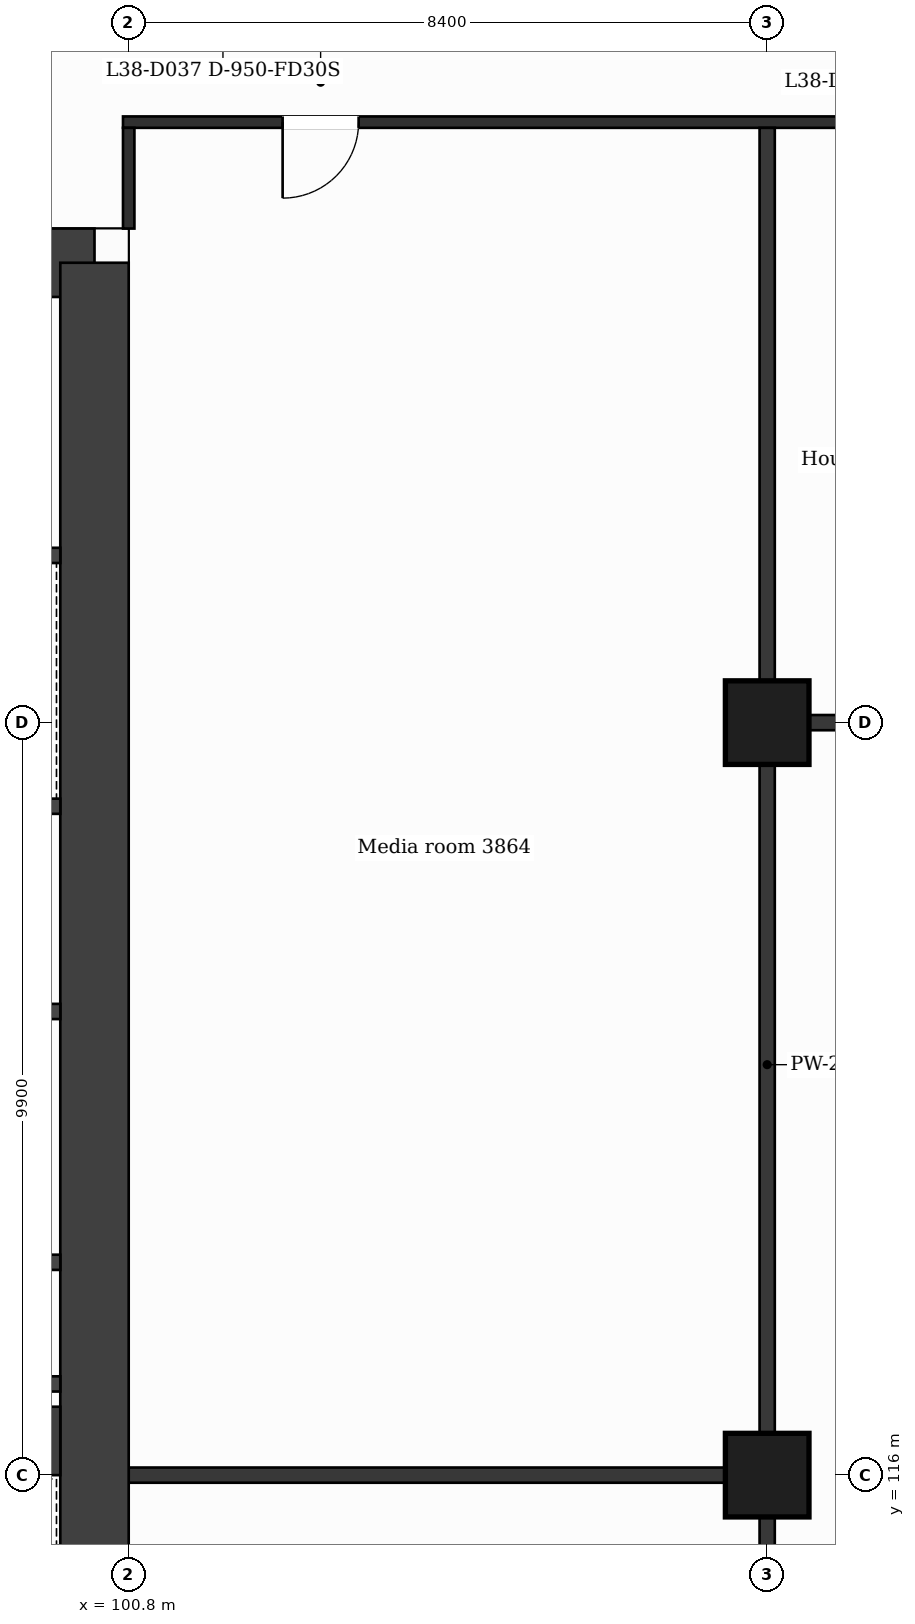
"""IFC4 building model, lengths in metres.
Left out: names, types, materials, properties, quantities, classifications, styles, units other than length and angle.
Written with IfcOpenShell. Run it as: python <this file> out.ifc"""

import sys

from ifc_helpers import new_model, si_unit, direction, frame, frame_2d, origin, origin_2d, place, context, subcontext, project, spatial, rectangle, extrude, element, fill, save


model = new_model("IFC4")
c1 = context("Model", 3, precision=1e-05, world=origin(), true_north=direction((0.0, 1.0)))
c2 = subcontext(c1, "Body", "Model", "MODEL_VIEW")
j1 = project(units=[si_unit("LENGTHUNIT", "METRE"), si_unit("PLANEANGLEUNIT", "RADIAN")], contexts=[c1])
p1 = place(None, origin())
s1 = spatial("IfcSite", under=j1, at=p1, CompositionType="ELEMENT")
p2 = place(p1, origin())
s2 = spatial("IfcBuilding", under=s1, at=p2, CompositionType="ELEMENT")
p3 = place(p2, frame((0.0, 0.0, 162.6)))
s3 = spatial("IfcBuildingStorey", under=s2, at=p3, CompositionType="ELEMENT", Elevation=162.6)
p4 = place(p3, frame((89.024, 131.95, 0.0), z_axis=(0.0, 0.0, 1.0), x_axis=(1.0, 0.0, 0.0)))
e1 = element("IfcWall", 1, at=p4, inside=s3, PredefinedType="SHEAR", context=c2, shape_type="SweptSolid", body=[
    extrude(rectangle(XDim=11.326, YDim=0.9, at=frame_2d((5.663, 0.0))), origin(), (0.0, 0.0, 1.0), 3.7),
])
p5 = place(p4, frame((6.739, 0.0, 0.0)))
e2 = element("IfcOpeningElement", 2, at=p5, cuts=e1, PredefinedType="OPENING", context=c2, shape_type="SweptSolid", body=[
    extrude(rectangle(XDim=1.2, YDim=2.1, at=frame_2d((0.6, 1.05))), frame((0.0, 0.46, 0.0), z_axis=(0.0, -1.0, 0.0), x_axis=(1.0, 0.0, 0.0)), (0.0, 0.0, 1.0), 0.92),
])
p6 = place(p3, frame((100.35, 131.95, 0.0), z_axis=(0.0, 0.0, 1.0), x_axis=(0.0, -1.0, 0.0)))
e3 = element("IfcWall", 3, at=p6, inside=s3, PredefinedType="SHEAR", context=c2, shape_type="SweptSolid", body=[
    extrude(rectangle(XDim=21.1, YDim=0.9, at=frame_2d((10.55, 0.0))), origin(), (0.0, 0.0, 1.0), 3.7),
])
p7 = place(p3, frame((94.8, 116.45, 0.0), z_axis=(0.0, 0.0, 1.0), x_axis=(1.0, 0.0, 0.0)))
e4 = element("IfcWall", 4, at=p7, inside=s3, PredefinedType="SHEAR", context=c2, shape_type="SweptSolid", body=[
    extrude(rectangle(XDim=5.1, YDim=0.9, at=frame_2d((2.55, 0.0))), origin(), (0.0, 0.0, 1.0), 3.7),
])
for number, where, z_axis, x_axis in (
    (5, (109.2, 116.0, 0.0), (0.0, 0.0, 1.0), (1.0, 0.0, 0.0)),
    (6, (109.2, 125.9, 0.0), (0.0, 0.0, 1.0), (1.0, 0.0, 0.0)),
):
    element("IfcColumn", number, at=place(p3, frame(where, z_axis=z_axis, x_axis=x_axis)), inside=s3, PredefinedType="COLUMN", context=c2, shape_type="SweptSolid", body=[
        extrude(rectangle(XDim=1.1, YDim=1.1, at=origin_2d()), origin(), (0.0, 0.0, 1.0), 3.7),
    ])
p8 = place(p3, frame((100.8, 116.0, 0.0), z_axis=(0.0, 0.0, 1.0), x_axis=(1.0, 0.0, 0.0)))
e7 = element("IfcWall", 7, at=p8, inside=s3, PredefinedType="PARTITIONING", context=c2, shape_type="SweptSolid", body=[
    extrude(rectangle(XDim=8.4, YDim=0.2, at=frame_2d((4.2, 0.0))), origin(), (0.0, 0.0, 1.0), 3.38),
])
for number, where, z_axis, x_axis in (
    (8, (95.227, 117.2, 0.0), (0.0, 0.0, 1.0), (1.0, 0.0, 0.0)),
    (9, (95.227, 118.8, 0.0), (0.0, 0.0, 1.0), (1.0, 0.0, 0.0)),
):
    element("IfcWall", number, at=place(p3, frame(where, z_axis=z_axis, x_axis=x_axis)), inside=s3, PredefinedType="PARTITIONING", context=c2, shape_type="SweptSolid", body=[
        extrude(rectangle(XDim=4.673, YDim=0.2, at=frame_2d((2.336, 0.0))), origin(), (0.0, 0.0, 1.0), 3.38),
    ])
p9 = place(p3, frame((95.227, 122.1, 0.0), z_axis=(0.0, 0.0, 1.0), x_axis=(1.0, 0.0, 0.0)))
e10 = element("IfcWall", 10, at=p9, inside=s3, PredefinedType="PARTITIONING", context=c2, shape_type="SweptSolid", body=[
    extrude(rectangle(XDim=4.673, YDim=0.2, at=frame_2d((2.336, 0.0))), origin(), (0.0, 0.0, 1.0), 3.38),
])
p10 = place(p9, frame((0.718, 0.0, 0.0)))
e11 = element("IfcOpeningElement", 11, at=p10, cuts=e10, PredefinedType="OPENING", context=c2, shape_type="SweptSolid", body=[
    extrude(rectangle(XDim=0.9, YDim=2.1, at=frame_2d((0.45, 1.05))), frame((0.0, 0.11, 0.0), z_axis=(0.0, -1.0, 0.0), x_axis=(1.0, 0.0, 0.0)), (0.0, 0.0, 1.0), 0.22),
])
p11 = place(p9, frame((2.981, 0.0, 0.0)))
e12 = element("IfcOpeningElement", 12, at=p11, cuts=e10, PredefinedType="OPENING", context=c2, shape_type="SweptSolid", body=[
    extrude(rectangle(XDim=0.9, YDim=2.1, at=frame_2d((0.45, 1.05))), frame((0.0, 0.11, 0.0), z_axis=(0.0, -1.0, 0.0), x_axis=(1.0, 0.0, 0.0)), (0.0, 0.0, 1.0), 0.22),
])
p12 = place(p3, frame((92.702, 124.8, 0.0), z_axis=(0.0, 0.0, 1.0), x_axis=(1.0, 0.0, 0.0)))
e13 = element("IfcWall", 13, at=p12, inside=s3, PredefinedType="PARTITIONING", context=c2, shape_type="SweptSolid", body=[
    extrude(rectangle(XDim=7.198, YDim=0.2, at=frame_2d((3.599, 0.0))), origin(), (0.0, 0.0, 1.0), 3.38),
])
p13 = place(p12, frame((5.33, 0.0, 0.0)))
e14 = element("IfcOpeningElement", 14, at=p13, cuts=e13, PredefinedType="OPENING", context=c2, shape_type="SweptSolid", body=[
    extrude(rectangle(XDim=1.1, YDim=2.1, at=frame_2d((0.55, 1.05))), frame((0.0, 0.11, 0.0), z_axis=(0.0, -1.0, 0.0), x_axis=(1.0, 0.0, 0.0)), (0.0, 0.0, 1.0), 0.22),
])
p14 = place(p3, frame((109.2, 125.9, 0.0), z_axis=(0.0, 0.0, 1.0), x_axis=(1.0, 0.0, 0.0)))
e15 = element("IfcWall", 15, at=p14, inside=s3, PredefinedType="PARTITIONING", context=c2, shape_type="SweptSolid", body=[
    extrude(rectangle(XDim=4.2, YDim=0.2, at=frame_2d((2.1, 0.0))), origin(), (0.0, 0.0, 1.0), 3.38),
])
p15 = place(p3, frame((92.827, 128.1, 0.0), z_axis=(0.0, 0.0, 1.0), x_axis=(1.0, 0.0, 0.0)))
e16 = element("IfcWall", 16, at=p15, inside=s3, PredefinedType="PARTITIONING", context=c2, shape_type="SweptSolid", body=[
    extrude(rectangle(XDim=7.073, YDim=0.2, at=frame_2d((3.537, 0.0))), origin(), (0.0, 0.0, 1.0), 3.38),
])
p16 = place(p15, frame((2.987, 0.0, 0.0)))
e17 = element("IfcOpeningElement", 17, at=p16, cuts=e16, PredefinedType="OPENING", context=c2, shape_type="SweptSolid", body=[
    extrude(rectangle(XDim=1.1, YDim=2.1, at=frame_2d((0.55, 1.05))), frame((0.0, 0.11, 0.0), z_axis=(0.0, -1.0, 0.0), x_axis=(1.0, 0.0, 0.0)), (0.0, 0.0, 1.0), 0.22),
])
p17 = place(p3, frame((100.725, 133.8, 0.0), z_axis=(0.0, 0.0, 1.0), x_axis=(1.0, 0.0, 0.0)))
e18 = element("IfcWall", 18, at=p17, inside=s3, PredefinedType="PARTITIONING", context=c2, shape_type="SweptSolid", body=[
    extrude(rectangle(XDim=25.35, YDim=0.15, at=frame_2d((12.675, 0.0))), origin(), (0.0, 0.0, 1.0), 3.38),
])
p18 = place(p17, frame((2.1, 0.0, 0.0)))
e19 = element("IfcOpeningElement", 19, at=p18, cuts=e18, PredefinedType="OPENING", context=c2, shape_type="SweptSolid", body=[
    extrude(rectangle(XDim=1.0, YDim=2.1, at=frame_2d((0.5, 1.05))), frame((0.0, 0.085, 0.0), z_axis=(0.0, -1.0, 0.0), x_axis=(1.0, 0.0, 0.0)), (0.0, 0.0, 1.0), 0.17),
])
p19 = place(p17, frame((9.825, 0.0, 0.0)))
e20 = element("IfcOpeningElement", 20, at=p19, cuts=e18, PredefinedType="OPENING", context=c2, shape_type="SweptSolid", body=[
    extrude(rectangle(XDim=1.0, YDim=2.1, at=frame_2d((0.5, 1.05))), frame((0.0, 0.085, 0.0), z_axis=(0.0, -1.0, 0.0), x_axis=(1.0, 0.0, 0.0)), (0.0, 0.0, 1.0), 0.17),
])
p20 = place(p17, frame((14.525, 0.0, 0.0)))
e21 = element("IfcOpeningElement", 21, at=p20, cuts=e18, PredefinedType="OPENING", context=c2, shape_type="SweptSolid", body=[
    extrude(rectangle(XDim=1.0, YDim=2.1, at=frame_2d((0.5, 1.05))), frame((0.0, 0.085, 0.0), z_axis=(0.0, -1.0, 0.0), x_axis=(1.0, 0.0, 0.0)), (0.0, 0.0, 1.0), 0.17),
])
p21 = place(p3, frame((100.8, 132.4, 0.0), z_axis=(0.0, 0.0, 1.0), x_axis=(0.0, 1.0, 0.0)))
e22 = element("IfcWall", 22, at=p21, inside=s3, PredefinedType="PARTITIONING", context=c2, shape_type="SweptSolid", body=[
    extrude(rectangle(XDim=1.325, YDim=0.15, at=frame_2d((0.663, 0.0))), origin(), (0.0, 0.0, 1.0), 3.38),
])
p22 = place(p3, frame((109.2, 109.075, 0.0), z_axis=(0.0, 0.0, 1.0), x_axis=(0.0, 1.0, 0.0)))
e23 = element("IfcWall", 23, at=p22, inside=s3, PredefinedType="PARTITIONING", context=c2, shape_type="SweptSolid", body=[
    extrude(rectangle(XDim=24.65, YDim=0.2, at=frame_2d((12.325, 0.0))), origin(), (0.0, 0.0, 1.0), 3.38),
])
p23 = place(p18, origin())
e24 = element("IfcDoor", 24, at=p23, inside=s3, OperationType="SINGLE_SWING_LEFT", PredefinedType="DOOR", context=c2, shape_type="SweptSolid", body=[
    extrude(rectangle(XDim=1.0, YDim=2.1, at=frame_2d((0.5, 1.05))), frame((0.0, 0.025, 0.0), z_axis=(0.0, -1.0, 0.0), x_axis=(1.0, 0.0, 0.0)), (0.0, 0.0, 1.0), 0.05),
])
fill(e19, e24)
save(model, sys.argv[1])
